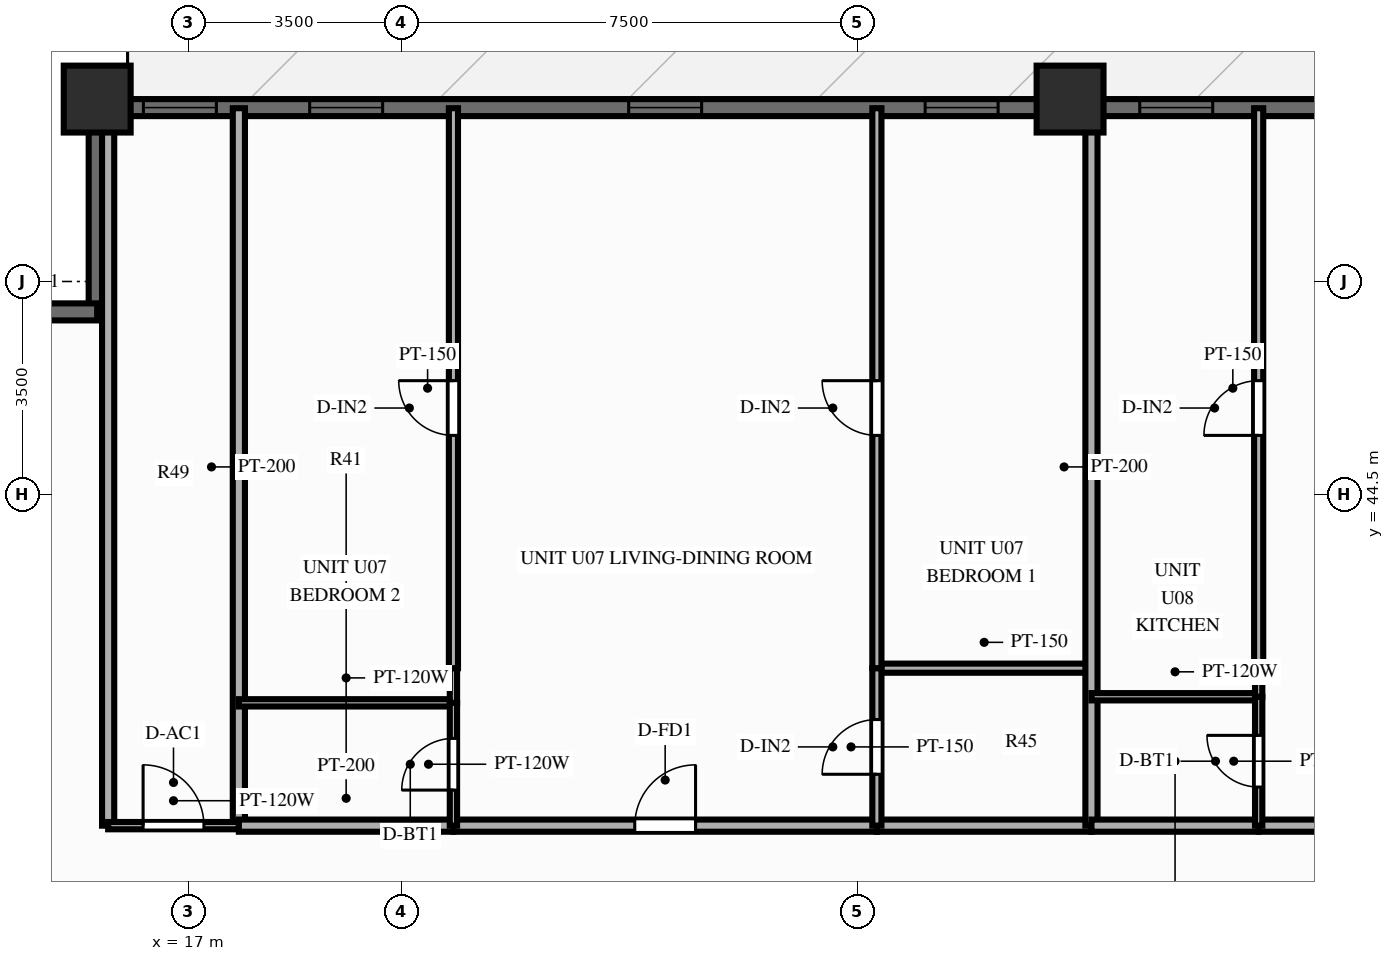
"""IFC4 building model, lengths in metres.
Left out: names, types, materials, properties, quantities, classifications, styles, units other than length and angle.
Written with IfcOpenShell. Run it as: python <this file> out.ifc"""

import sys

from ifc_helpers import new_model, si_unit, direction, frame, frame_2d, origin, origin_2d, place, context, subcontext, project, spatial, rectangle, extrude, source, transform, mapped, element, fill, save


model = new_model("IFC4")
c1 = context("Model", 3, precision=1e-05, world=origin(), true_north=direction((0.0, 1.0)))
c2 = subcontext(c1, "Body", "Model", "MODEL_VIEW")
j1 = project(units=[si_unit("LENGTHUNIT", "METRE"), si_unit("PLANEANGLEUNIT", "RADIAN")], contexts=[c1])
p1 = place(None, origin())
s1 = spatial("IfcSite", under=j1, at=p1, CompositionType="ELEMENT")
p2 = place(p1, origin())
s2 = spatial("IfcBuilding", under=s1, at=p2, CompositionType="ELEMENT")
p3 = place(p2, frame((0.0, 0.0, 22.4)))
s3 = spatial("IfcBuildingStorey", under=s2, at=p3, CompositionType="ELEMENT", Elevation=22.4)
m1 = source(origin(), c2, "Body", "SweptSolid", [
    extrude(rectangle(XDim=1.1, YDim=1.1, at=origin_2d()), origin(), (0.0, 0.0, 1.0), 3.0),
])
for number, where, z_axis, x_axis in (
    (1, (31.5, 51.0, 0.0), (0.0, 0.0, 1.0), (1.0, 0.0, 0.0)),
    (2, (15.5, 51.0, 0.0), (0.0, 0.0, 1.0), (1.0, 0.0, 0.0)),
):
    element("IfcColumn", number, at=place(p3, frame(where, z_axis=z_axis, x_axis=x_axis)), inside=s3, PredefinedType="COLUMN", context=c2, shape_type="MappedRepresentation", body=[
        mapped(m1, transform((0.0, 0.0, 0.0), scale=1.0)),
    ])
p4 = place(p3, frame((15.5, 50.86, 0.0), z_axis=(0.0, 0.0, 1.0), x_axis=(1.0, 0.0, 0.0)))
e3 = element("IfcWall", 3, at=p4, inside=s3, PredefinedType="SOLIDWALL", context=c2, shape_type="SweptSolid", body=[
    extrude(rectangle(XDim=45.0, YDim=0.28, at=frame_2d((22.5, 0.0))), origin(), (0.0, 0.0, 1.0), 2.28),
])
p5 = place(p4, frame((0.76, 0.0, 0.25)))
e4 = element("IfcOpeningElement", 4, at=p5, cuts=e3, PredefinedType="OPENING", context=c2, shape_type="SweptSolid", body=[
    extrude(rectangle(XDim=1.2, YDim=1.5, at=frame_2d((0.6, 0.75))), frame((0.0, 0.152, 0.0), z_axis=(0.0, -1.0, 0.0), x_axis=(1.0, 0.0, 0.0)), (0.0, 0.0, 1.0), 0.304),
])
p6 = place(p4, frame((3.494, 0.0, 0.25)))
e5 = element("IfcOpeningElement", 5, at=p6, cuts=e3, PredefinedType="OPENING", context=c2, shape_type="SweptSolid", body=[
    extrude(rectangle(XDim=1.2, YDim=1.5, at=frame_2d((0.6, 0.75))), frame((0.0, 0.152, 0.0), z_axis=(0.0, -1.0, 0.0), x_axis=(1.0, 0.0, 0.0)), (0.0, 0.0, 1.0), 0.304),
])
p7 = place(p4, frame((8.741, 0.0, 0.25)))
e6 = element("IfcOpeningElement", 6, at=p7, cuts=e3, PredefinedType="OPENING", context=c2, shape_type="SweptSolid", body=[
    extrude(rectangle(XDim=1.2, YDim=1.5, at=frame_2d((0.6, 0.75))), frame((0.0, 0.152, 0.0), z_axis=(0.0, -1.0, 0.0), x_axis=(1.0, 0.0, 0.0)), (0.0, 0.0, 1.0), 0.304),
])
p8 = place(p4, frame((13.616, 0.0, 0.25)))
e7 = element("IfcOpeningElement", 7, at=p8, cuts=e3, PredefinedType="OPENING", context=c2, shape_type="SweptSolid", body=[
    extrude(rectangle(XDim=1.2, YDim=1.5, at=frame_2d((0.6, 0.75))), frame((0.0, 0.152, 0.0), z_axis=(0.0, -1.0, 0.0), x_axis=(1.0, 0.0, 0.0)), (0.0, 0.0, 1.0), 0.304),
])
p9 = place(p4, frame((17.146, 0.0, 0.25)))
e8 = element("IfcOpeningElement", 8, at=p9, cuts=e3, PredefinedType="OPENING", context=c2, shape_type="SweptSolid", body=[
    extrude(rectangle(XDim=1.2, YDim=1.5, at=frame_2d((0.6, 0.75))), frame((0.0, 0.152, 0.0), z_axis=(0.0, -1.0, 0.0), x_axis=(1.0, 0.0, 0.0)), (0.0, 0.0, 1.0), 0.304),
])
p10 = place(p4, frame((22.423, 0.0, 0.0)))
e9 = element("IfcOpeningElement", 9, at=p10, cuts=e3, PredefinedType="OPENING", context=c2, shape_type="SweptSolid", body=[
    extrude(rectangle(XDim=1.1, YDim=2.15, at=frame_2d((0.55, 1.075))), frame((0.0, 0.152, 0.0), z_axis=(0.0, -1.0, 0.0), x_axis=(1.0, 0.0, 0.0)), (0.0, 0.0, 1.0), 0.304),
])
p11 = place(p4, frame((27.252, 0.0, 0.25)))
e10 = element("IfcOpeningElement", 10, at=p11, cuts=e3, PredefinedType="OPENING", context=c2, shape_type="SweptSolid", body=[
    extrude(rectangle(XDim=0.95, YDim=1.5, at=frame_2d((0.475, 0.75))), frame((0.0, 0.152, 0.0), z_axis=(0.0, -1.0, 0.0), x_axis=(1.0, 0.0, 0.0)), (0.0, 0.0, 1.0), 0.304),
])
p12 = place(p4, frame((30.873, 0.0, 0.25)))
e11 = element("IfcOpeningElement", 11, at=p12, cuts=e3, PredefinedType="OPENING", context=c2, shape_type="SweptSolid", body=[
    extrude(rectangle(XDim=1.2, YDim=1.5, at=frame_2d((0.6, 0.75))), frame((0.0, 0.152, 0.0), z_axis=(0.0, -1.0, 0.0), x_axis=(1.0, 0.0, 0.0)), (0.0, 0.0, 1.0), 0.304),
])
p13 = place(p4, frame((33.113, 0.0, 0.25)))
e12 = element("IfcOpeningElement", 12, at=p13, cuts=e3, PredefinedType="OPENING", context=c2, shape_type="SweptSolid", body=[
    extrude(rectangle(XDim=1.2, YDim=1.5, at=frame_2d((0.6, 0.75))), frame((0.0, 0.152, 0.0), z_axis=(0.0, -1.0, 0.0), x_axis=(1.0, 0.0, 0.0)), (0.0, 0.0, 1.0), 0.304),
])
p14 = place(p4, frame((35.624, 0.0, 0.25)))
e13 = element("IfcOpeningElement", 13, at=p14, cuts=e3, PredefinedType="OPENING", context=c2, shape_type="SweptSolid", body=[
    extrude(rectangle(XDim=1.2, YDim=1.5, at=frame_2d((0.6, 0.75))), frame((0.0, 0.152, 0.0), z_axis=(0.0, -1.0, 0.0), x_axis=(1.0, 0.0, 0.0)), (0.0, 0.0, 1.0), 0.304),
])
p15 = place(p4, frame((38.097, 0.0, 0.25)))
e14 = element("IfcOpeningElement", 14, at=p15, cuts=e3, PredefinedType="OPENING", context=c2, shape_type="SweptSolid", body=[
    extrude(rectangle(XDim=1.2, YDim=1.5, at=frame_2d((0.6, 0.75))), frame((0.0, 0.152, 0.0), z_axis=(0.0, -1.0, 0.0), x_axis=(1.0, 0.0, 0.0)), (0.0, 0.0, 1.0), 0.304),
])
p16 = place(p4, frame((40.336, 0.0, 0.25)))
e15 = element("IfcOpeningElement", 15, at=p16, cuts=e3, PredefinedType="OPENING", context=c2, shape_type="SweptSolid", body=[
    extrude(rectangle(XDim=1.2, YDim=1.5, at=frame_2d((0.6, 0.75))), frame((0.0, 0.152, 0.0), z_axis=(0.0, -1.0, 0.0), x_axis=(1.0, 0.0, 0.0)), (0.0, 0.0, 1.0), 0.304),
])
p17 = place(p4, frame((42.743, 0.0, 0.25)))
e16 = element("IfcOpeningElement", 16, at=p17, cuts=e3, PredefinedType="OPENING", context=c2, shape_type="SweptSolid", body=[
    extrude(rectangle(XDim=1.2, YDim=1.5, at=frame_2d((0.6, 0.75))), frame((0.0, 0.152, 0.0), z_axis=(0.0, -1.0, 0.0), x_axis=(1.0, 0.0, 0.0)), (0.0, 0.0, 1.0), 0.304),
])
for number, where, z_axis, x_axis in (
    (17, (15.5, 47.5, 0.0), (0.0, 0.0, 1.0), (0.0, 1.0, 0.0)),
    (18, (12.08, 47.5, 0.0), (0.0, 0.0, 1.0), (1.0, 0.0, 0.0)),
):
    element("IfcWall", number, at=place(p3, frame(where, z_axis=z_axis, x_axis=x_axis)), inside=s3, PredefinedType="SOLIDWALL", context=c2, shape_type="SweptSolid", body=[
        extrude(rectangle(XDim=3.42, YDim=0.28, at=frame_2d((1.71, 0.0))), origin(), (0.0, 0.0, 1.0), 2.28),
    ])
for number, where, z_axis, x_axis in (
    (19, (15.68, 39.05, 0.0), (0.0, 0.0, 1.0), (0.0, 1.0, 0.0)),
    (20, (17.83, 39.05, 0.0), (0.0, 0.0, 1.0), (0.0, 1.0, 0.0)),
):
    element("IfcWall", number, at=place(p3, frame(where, z_axis=z_axis, x_axis=x_axis)), inside=s3, PredefinedType="PARTITIONING", context=c2, shape_type="SweptSolid", body=[
        extrude(rectangle(XDim=11.8, YDim=0.2, at=frame_2d((5.9, 0.0))), origin(), (0.0, 0.0, 1.0), 2.79),
    ])
p18 = place(p3, frame((15.68, 39.05, 0.0), z_axis=(0.0, 0.0, 1.0), x_axis=(1.0, 0.0, 0.0)))
e21 = element("IfcWall", 21, at=p18, inside=s3, PredefinedType="PARTITIONING", context=c2, shape_type="SweptSolid", body=[
    extrude(rectangle(XDim=2.15, YDim=0.12, at=frame_2d((1.075, 0.0))), origin(), (0.0, 0.0, 1.0), 2.79),
])
p19 = place(p18, frame((0.575, 0.0, 0.0)))
e22 = element("IfcOpeningElement", 22, at=p19, cuts=e21, PredefinedType="OPENING", context=c2, shape_type="SweptSolid", body=[
    extrude(rectangle(XDim=1.0, YDim=2.1, at=frame_2d((0.5, 1.05))), frame((0.0, 0.072, 0.0), z_axis=(0.0, -1.0, 0.0), x_axis=(1.0, 0.0, 0.0)), (0.0, 0.0, 1.0), 0.144),
])
p20 = place(p3, frame((17.83, 39.05, 0.0), z_axis=(0.0, 0.0, 1.0), x_axis=(1.0, 0.0, 0.0)))
e23 = element("IfcWall", 23, at=p20, inside=s3, PredefinedType="PARTITIONING", context=c2, shape_type="SweptSolid", body=[
    extrude(rectangle(XDim=3.529, YDim=0.2, at=frame_2d((1.764, 0.0))), origin(), (0.0, 0.0, 1.0), 2.79),
])
p21 = place(p3, frame((21.359, 39.05, 0.0), z_axis=(0.0, 0.0, 1.0), x_axis=(1.0, 0.0, 0.0)))
e24 = element("IfcWall", 24, at=p21, inside=s3, PredefinedType="PARTITIONING", context=c2, shape_type="SweptSolid", body=[
    extrude(rectangle(XDim=6.964, YDim=0.2, at=frame_2d((3.482, 0.0))), origin(), (0.0, 0.0, 1.0), 2.79),
])
p22 = place(p21, frame((2.982, 0.0, 0.0)))
e25 = element("IfcOpeningElement", 25, at=p22, cuts=e24, PredefinedType="OPENING", context=c2, shape_type="SweptSolid", body=[
    extrude(rectangle(XDim=1.0, YDim=2.15, at=frame_2d((0.5, 1.075))), frame((0.0, 0.112, 0.0), z_axis=(0.0, -1.0, 0.0), x_axis=(1.0, 0.0, 0.0)), (0.0, 0.0, 1.0), 0.224),
])
p23 = place(p3, frame((28.323, 39.05, 0.0), z_axis=(0.0, 0.0, 1.0), x_axis=(1.0, 0.0, 0.0)))
e26 = element("IfcWall", 26, at=p23, inside=s3, PredefinedType="PARTITIONING", context=c2, shape_type="SweptSolid", body=[
    extrude(rectangle(XDim=3.529, YDim=0.2, at=frame_2d((1.764, 0.0))), origin(), (0.0, 0.0, 1.0), 2.79),
])
p24 = place(p3, frame((17.83, 41.07, 0.0), z_axis=(0.0, 0.0, 1.0), x_axis=(1.0, 0.0, 0.0)))
e27 = element("IfcWall", 27, at=p24, inside=s3, PredefinedType="PARTITIONING", context=c2, shape_type="SweptSolid", body=[
    extrude(rectangle(XDim=3.529, YDim=0.12, at=frame_2d((1.764, 0.0))), origin(), (0.0, 0.0, 1.0), 2.79),
])
p25 = place(p3, frame((28.323, 41.64, 0.0), z_axis=(0.0, 0.0, 1.0), x_axis=(1.0, 0.0, 0.0)))
e28 = element("IfcWall", 28, at=p25, inside=s3, PredefinedType="PARTITIONING", context=c2, shape_type="SweptSolid", body=[
    extrude(rectangle(XDim=3.529, YDim=0.15, at=frame_2d((1.764, 0.0))), origin(), (0.0, 0.0, 1.0), 2.79),
])
p26 = place(p3, frame((21.359, 39.05, 0.0), z_axis=(0.0, 0.0, 1.0), x_axis=(0.0, 1.0, 0.0)))
e29 = element("IfcWall", 29, at=p26, inside=s3, PredefinedType="PARTITIONING", context=c2, shape_type="SweptSolid", body=[
    extrude(rectangle(XDim=2.02, YDim=0.12, at=frame_2d((1.01, 0.0))), origin(), (0.0, 0.0, 1.0), 2.79),
])
p27 = place(p26, frame((0.585, 0.0, 0.0)))
e30 = element("IfcOpeningElement", 30, at=p27, cuts=e29, PredefinedType="OPENING", context=c2, shape_type="SweptSolid", body=[
    extrude(rectangle(XDim=0.85, YDim=2.05, at=frame_2d((0.425, 1.025))), frame((0.0, 0.072, 0.0), z_axis=(0.0, -1.0, 0.0), x_axis=(1.0, 0.0, 0.0)), (0.0, 0.0, 1.0), 0.144),
])
p28 = place(p3, frame((21.359, 41.07, 0.0), z_axis=(0.0, 0.0, 1.0), x_axis=(0.0, 1.0, 0.0)))
e31 = element("IfcWall", 31, at=p28, inside=s3, PredefinedType="PARTITIONING", context=c2, shape_type="SweptSolid", body=[
    extrude(rectangle(XDim=0.57, YDim=0.12, at=frame_2d((0.285, 0.0))), origin(), (0.0, 0.0, 1.0), 2.79),
])
p29 = place(p3, frame((21.359, 41.64, 0.0), z_axis=(0.0, 0.0, 1.0), x_axis=(0.0, 1.0, 0.0)))
e32 = element("IfcWall", 32, at=p29, inside=s3, PredefinedType="PARTITIONING", context=c2, shape_type="SweptSolid", body=[
    extrude(rectangle(XDim=9.21, YDim=0.15, at=frame_2d((4.605, 0.0))), origin(), (0.0, 0.0, 1.0), 2.79),
])
p30 = place(p29, frame((3.829, 0.0, 0.0)))
e33 = element("IfcOpeningElement", 33, at=p30, cuts=e32, PredefinedType="OPENING", context=c2, shape_type="SweptSolid", body=[
    extrude(rectangle(XDim=0.9, YDim=2.1, at=frame_2d((0.45, 1.05))), frame((0.0, 0.087, 0.0), z_axis=(0.0, -1.0, 0.0), x_axis=(1.0, 0.0, 0.0)), (0.0, 0.0, 1.0), 0.174),
])
p31 = place(p3, frame((28.323, 39.05, 0.0), z_axis=(0.0, 0.0, 1.0), x_axis=(0.0, 1.0, 0.0)))
e34 = element("IfcWall", 34, at=p31, inside=s3, PredefinedType="PARTITIONING", context=c2, shape_type="SweptSolid", body=[
    extrude(rectangle(XDim=2.59, YDim=0.15, at=frame_2d((1.295, 0.0))), origin(), (0.0, 0.0, 1.0), 2.79),
])
p32 = place(p31, frame((0.845, 0.0, 0.0)))
e35 = element("IfcOpeningElement", 35, at=p32, cuts=e34, PredefinedType="OPENING", context=c2, shape_type="SweptSolid", body=[
    extrude(rectangle(XDim=0.9, YDim=2.1, at=frame_2d((0.45, 1.05))), frame((0.0, 0.087, 0.0), z_axis=(0.0, -1.0, 0.0), x_axis=(1.0, 0.0, 0.0)), (0.0, 0.0, 1.0), 0.174),
])
p33 = place(p3, frame((28.323, 41.64, 0.0), z_axis=(0.0, 0.0, 1.0), x_axis=(0.0, 1.0, 0.0)))
e36 = element("IfcWall", 36, at=p33, inside=s3, PredefinedType="PARTITIONING", context=c2, shape_type="SweptSolid", body=[
    extrude(rectangle(XDim=9.21, YDim=0.15, at=frame_2d((4.605, 0.0))), origin(), (0.0, 0.0, 1.0), 2.79),
])
p34 = place(p33, frame((3.829, 0.0, 0.0)))
e37 = element("IfcOpeningElement", 37, at=p34, cuts=e36, PredefinedType="OPENING", context=c2, shape_type="SweptSolid", body=[
    extrude(rectangle(XDim=0.9, YDim=2.1, at=frame_2d((0.45, 1.05))), frame((0.0, 0.087, 0.0), z_axis=(0.0, -1.0, 0.0), x_axis=(1.0, 0.0, 0.0)), (0.0, 0.0, 1.0), 0.174),
])
p35 = place(p3, frame((31.852, 39.05, 0.0), z_axis=(0.0, 0.0, 1.0), x_axis=(0.0, 1.0, 0.0)))
e38 = element("IfcWall", 38, at=p35, inside=s3, PredefinedType="PARTITIONING", context=c2, shape_type="SweptSolid", body=[
    extrude(rectangle(XDim=11.8, YDim=0.2, at=frame_2d((5.9, 0.0))), origin(), (0.0, 0.0, 1.0), 2.79),
])
p36 = place(p3, frame((31.852, 39.05, 0.0), z_axis=(0.0, 0.0, 1.0), x_axis=(1.0, 0.0, 0.0)))
e39 = element("IfcWall", 39, at=p36, inside=s3, PredefinedType="PARTITIONING", context=c2, shape_type="SweptSolid", body=[
    extrude(rectangle(XDim=2.75, YDim=0.2, at=frame_2d((1.375, 0.0))), origin(), (0.0, 0.0, 1.0), 2.79),
])
p37 = place(p3, frame((34.602, 39.05, 0.0), z_axis=(0.0, 0.0, 1.0), x_axis=(1.0, 0.0, 0.0)))
e40 = element("IfcWall", 40, at=p37, inside=s3, PredefinedType="PARTITIONING", context=c2, shape_type="SweptSolid", body=[
    extrude(rectangle(XDim=7.743, YDim=0.2, at=frame_2d((3.871, 0.0))), origin(), (0.0, 0.0, 1.0), 2.79),
])
p38 = place(p37, frame((3.371, 0.0, 0.0)))
e41 = element("IfcOpeningElement", 41, at=p38, cuts=e40, PredefinedType="OPENING", context=c2, shape_type="SweptSolid", body=[
    extrude(rectangle(XDim=1.0, YDim=2.15, at=frame_2d((0.5, 1.075))), frame((0.0, 0.112, 0.0), z_axis=(0.0, -1.0, 0.0), x_axis=(1.0, 0.0, 0.0)), (0.0, 0.0, 1.0), 0.224),
])
p39 = place(p3, frame((31.852, 41.17, 0.0), z_axis=(0.0, 0.0, 1.0), x_axis=(1.0, 0.0, 0.0)))
e42 = element("IfcWall", 42, at=p39, inside=s3, PredefinedType="PARTITIONING", context=c2, shape_type="SweptSolid", body=[
    extrude(rectangle(XDim=2.75, YDim=0.12, at=frame_2d((1.375, 0.0))), origin(), (0.0, 0.0, 1.0), 2.79),
])
p40 = place(p3, frame((34.602, 39.05, 0.0), z_axis=(0.0, 0.0, 1.0), x_axis=(0.0, 1.0, 0.0)))
e43 = element("IfcWall", 43, at=p40, inside=s3, PredefinedType="PARTITIONING", context=c2, shape_type="SweptSolid", body=[
    extrude(rectangle(XDim=2.12, YDim=0.12, at=frame_2d((1.06, 0.0))), origin(), (0.0, 0.0, 1.0), 2.79),
])
p41 = place(p40, frame((0.635, 0.0, 0.0)))
e44 = element("IfcOpeningElement", 44, at=p41, cuts=e43, PredefinedType="OPENING", context=c2, shape_type="SweptSolid", body=[
    extrude(rectangle(XDim=0.85, YDim=2.05, at=frame_2d((0.425, 1.025))), frame((0.0, 0.072, 0.0), z_axis=(0.0, -1.0, 0.0), x_axis=(1.0, 0.0, 0.0)), (0.0, 0.0, 1.0), 0.144),
])
p42 = place(p3, frame((34.602, 41.17, 0.0), z_axis=(0.0, 0.0, 1.0), x_axis=(0.0, 1.0, 0.0)))
e45 = element("IfcWall", 45, at=p42, inside=s3, PredefinedType="PARTITIONING", context=c2, shape_type="SweptSolid", body=[
    extrude(rectangle(XDim=0.47, YDim=0.12, at=frame_2d((0.235, 0.0))), origin(), (0.0, 0.0, 1.0), 2.79),
])
p43 = place(p3, frame((34.602, 41.64, 0.0), z_axis=(0.0, 0.0, 1.0), x_axis=(0.0, 1.0, 0.0)))
e46 = element("IfcWall", 46, at=p43, inside=s3, PredefinedType="PARTITIONING", context=c2, shape_type="SweptSolid", body=[
    extrude(rectangle(XDim=9.21, YDim=0.15, at=frame_2d((4.605, 0.0))), origin(), (0.0, 0.0, 1.0), 2.79),
])
p44 = place(p43, frame((3.829, 0.0, 0.0)))
e47 = element("IfcOpeningElement", 47, at=p44, cuts=e46, PredefinedType="OPENING", context=c2, shape_type="SweptSolid", body=[
    extrude(rectangle(XDim=0.9, YDim=2.1, at=frame_2d((0.45, 1.05))), frame((0.0, 0.087, 0.0), z_axis=(0.0, -1.0, 0.0), x_axis=(1.0, 0.0, 0.0)), (0.0, 0.0, 1.0), 0.174),
])
m2 = source(origin(), c2, "Body", "SweptSolid", [
    extrude(rectangle(XDim=1.2, YDim=1.5, at=frame_2d((0.6, 0.75))), frame((0.0, 0.03, 0.0), z_axis=(0.0, -1.0, 0.0), x_axis=(1.0, 0.0, 0.0)), (0.0, 0.0, 1.0), 0.06),
])
p45 = place(p5, origin())
e48 = element("IfcWindow", 48, at=p45, inside=s3, PartitioningType="SINGLE_PANEL", PredefinedType="WINDOW", context=c2, shape_type="MappedRepresentation", body=[
    mapped(m2, transform((0.0, 0.0, 0.0), scale=1.0)),
])
fill(e4, e48)
p46 = place(p6, origin())
e49 = element("IfcWindow", 49, at=p46, inside=s3, PartitioningType="SINGLE_PANEL", PredefinedType="WINDOW", context=c2, shape_type="MappedRepresentation", body=[
    mapped(m2, transform((0.0, 0.0, 0.0), scale=1.0)),
])
fill(e5, e49)
p47 = place(p7, origin())
e50 = element("IfcWindow", 50, at=p47, inside=s3, PartitioningType="SINGLE_PANEL", PredefinedType="WINDOW", context=c2, shape_type="MappedRepresentation", body=[
    mapped(m2, transform((0.0, 0.0, 0.0), scale=1.0)),
])
fill(e6, e50)
p48 = place(p8, origin())
e51 = element("IfcWindow", 51, at=p48, inside=s3, PartitioningType="SINGLE_PANEL", PredefinedType="WINDOW", context=c2, shape_type="MappedRepresentation", body=[
    mapped(m2, transform((0.0, 0.0, 0.0), scale=1.0)),
])
fill(e7, e51)
p49 = place(p9, origin())
e52 = element("IfcWindow", 52, at=p49, inside=s3, PartitioningType="SINGLE_PANEL", PredefinedType="WINDOW", context=c2, shape_type="MappedRepresentation", body=[
    mapped(m2, transform((0.0, 0.0, 0.0), scale=1.0)),
])
fill(e8, e52)
m3 = source(origin(), c2, "Body", "SweptSolid", [
    extrude(rectangle(XDim=1.0, YDim=2.1, at=frame_2d((0.5, 1.05))), frame((0.0, 0.025, 0.0), z_axis=(0.0, -1.0, 0.0), x_axis=(1.0, 0.0, 0.0)), (0.0, 0.0, 1.0), 0.05),
])
p50 = place(p19, origin())
e53 = element("IfcDoor", 53, at=p50, inside=s3, OperationType="SINGLE_SWING_LEFT", PredefinedType="DOOR", context=c2, shape_type="MappedRepresentation", body=[
    mapped(m3, transform((0.0, 0.0, 0.0), scale=1.0)),
])
fill(e22, e53)
m4 = source(origin(), c2, "Body", "SweptSolid", [
    extrude(rectangle(XDim=1.0, YDim=2.15, at=frame_2d((0.5, 1.075))), frame((0.0, 0.025, 0.0), z_axis=(0.0, -1.0, 0.0), x_axis=(1.0, 0.0, 0.0)), (0.0, 0.0, 1.0), 0.05),
])
p51 = place(p22, origin())
e54 = element("IfcDoor", 54, at=p51, inside=s3, OperationType="SINGLE_SWING_RIGHT", PredefinedType="DOOR", context=c2, shape_type="MappedRepresentation", body=[
    mapped(m4, transform((0.0, 0.0, 0.0), scale=1.0)),
])
fill(e25, e54)
m5 = source(origin(), c2, "Body", "SweptSolid", [
    extrude(rectangle(XDim=0.85, YDim=2.05, at=frame_2d((0.425, 1.025))), frame((0.0, 0.025, 0.0), z_axis=(0.0, -1.0, 0.0), x_axis=(1.0, 0.0, 0.0)), (0.0, 0.0, 1.0), 0.05),
])
p52 = place(p27, origin())
e55 = element("IfcDoor", 55, at=p52, inside=s3, OperationType="SINGLE_SWING_LEFT", PredefinedType="DOOR", context=c2, shape_type="MappedRepresentation", body=[
    mapped(m5, transform((0.0, 0.0, 0.0), scale=1.0)),
])
fill(e30, e55)
m6 = source(origin(), c2, "Body", "SweptSolid", [
    extrude(rectangle(XDim=0.9, YDim=2.1, at=frame_2d((0.45, 1.05))), frame((0.0, 0.025, 0.0), z_axis=(0.0, -1.0, 0.0), x_axis=(1.0, 0.0, 0.0)), (0.0, 0.0, 1.0), 0.05),
])
p53 = place(p30, origin())
e56 = element("IfcDoor", 56, at=p53, inside=s3, OperationType="SINGLE_SWING_RIGHT", PredefinedType="DOOR", context=c2, shape_type="MappedRepresentation", body=[
    mapped(m6, transform((0.0, 0.0, 0.0), scale=1.0)),
])
fill(e33, e56)
p54 = place(p32, origin())
e57 = element("IfcDoor", 57, at=p54, inside=s3, OperationType="SINGLE_SWING_LEFT", PredefinedType="DOOR", context=c2, shape_type="MappedRepresentation", body=[
    mapped(m6, transform((0.0, 0.0, 0.0), scale=1.0)),
])
fill(e35, e57)
p55 = place(p34, origin())
e58 = element("IfcDoor", 58, at=p55, inside=s3, OperationType="SINGLE_SWING_RIGHT", PredefinedType="DOOR", context=c2, shape_type="MappedRepresentation", body=[
    mapped(m6, transform((0.0, 0.0, 0.0), scale=1.0)),
])
fill(e37, e58)
p56 = place(p41, origin())
e59 = element("IfcDoor", 59, at=p56, inside=s3, OperationType="SINGLE_SWING_RIGHT", PredefinedType="DOOR", context=c2, shape_type="MappedRepresentation", body=[
    mapped(m5, transform((0.0, 0.0, 0.0), scale=1.0)),
])
fill(e44, e59)
p57 = place(p44, origin())
e60 = element("IfcDoor", 60, at=p57, inside=s3, OperationType="SINGLE_SWING_LEFT", PredefinedType="DOOR", context=c2, shape_type="MappedRepresentation", body=[
    mapped(m6, transform((0.0, 0.0, 0.0), scale=1.0)),
])
fill(e47, e60)
save(model, sys.argv[1])
